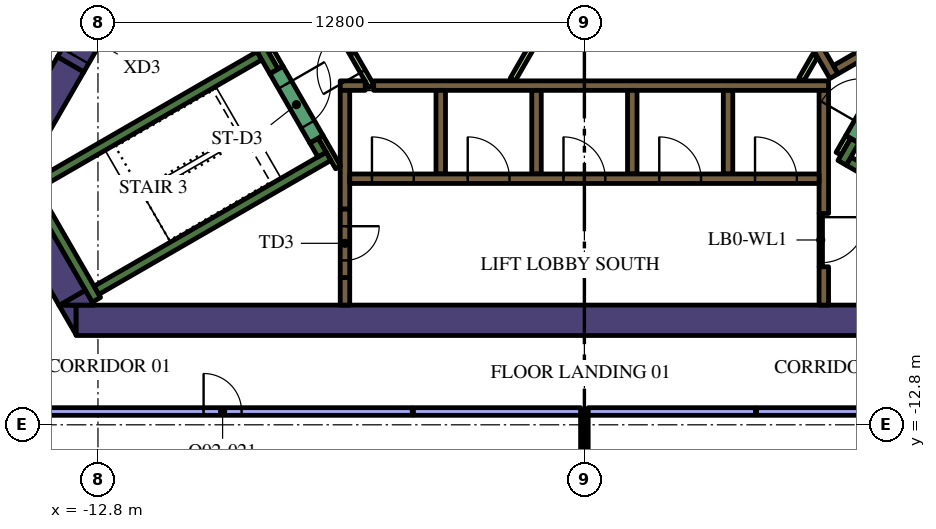
"""IFC4 building model, lengths in metres.
Left out: names, types, materials, properties, quantities, classifications, styles, units other than length and angle.
Written with IfcOpenShell. Run it as: python <this file> out.ifc"""

import sys

from ifc_helpers import new_model, si_unit, direction, frame, frame_2d, origin, place, context, subcontext, project, spatial, polyline, rectangle, outline, extrude, element, fill, save


model = new_model("IFC4")
c1 = context("Model", 3, precision=1e-05, world=origin(), true_north=direction((0.0, 1.0)))
c2 = subcontext(c1, "Body", "Model", "MODEL_VIEW")
j1 = project(units=[si_unit("LENGTHUNIT", "METRE"), si_unit("PLANEANGLEUNIT", "RADIAN")], contexts=[c1])
p1 = place(None, origin())
s1 = spatial("IfcSite", under=j1, at=p1, CompositionType="ELEMENT")
p2 = place(p1, origin())
s2 = spatial("IfcBuilding", under=s1, at=p2, CompositionType="ELEMENT")
p3 = place(p2, frame((0.0, 0.0, 154.2)))
s3 = spatial("IfcBuildingStorey", under=s2, at=p3, CompositionType="ELEMENT", Elevation=154.2)
p4 = place(p3, frame((-13.378, -10.05, 0.0), z_axis=(0.0, 0.0, 1.0), x_axis=(1.0, 0.0, 0.0)))
e1 = element("IfcWall", 1, at=p4, inside=s3, PredefinedType="SOLIDWALL", context=c2, shape_type="SweptSolid", body=[
    extrude(rectangle(XDim=22.282, YDim=0.8, at=frame_2d((11.141, 0.0))), origin(), (0.0, 0.0, 1.0), 4.2),
])
p5 = place(p3, origin())
e2 = element("IfcWall", 2, at=p5, inside=s3, PredefinedType="SOLIDWALL", context=c2, shape_type="SweptSolid", body=[
    extrude(outline(polyline([(-13.828, -9.65), (-13.38, -9.65), (-13.38, -10.426), (-13.828, -9.65)])), origin(), (0.0, 0.0, 1.0), 4.2),
])
p6 = place(p3, frame((-15.387, -6.148, 0.0), z_axis=(0.0, 0.0, 1.0), x_axis=(0.499984020225, -0.866034629516, 0.0)))
e3 = element("IfcWall", 3, at=p6, inside=s3, PredefinedType="SOLIDWALL", context=c2, shape_type="SweptSolid", body=[
    extrude(rectangle(XDim=3.824, YDim=0.8, at=frame_2d((1.912, 0.0))), origin(), (0.0, 0.0, 1.0), 4.2),
])
e4 = element("IfcWall", 4, at=p5, inside=s3, PredefinedType="SOLIDWALL", context=c2, shape_type="SweptSolid", body=[
    extrude(outline(polyline([(-12.904, -9.65), (-13.8, -9.65), (-13.128, -9.262), (-12.904, -9.65)])), origin(), (0.0, 0.0, 1.0), 4.2),
])
p7 = place(p3, frame((-13.518, -3.314, 0.0), z_axis=(0.0, 0.0, 1.0), x_axis=(-0.499969377405, -0.866043083026, 0.0)))
e5 = element("IfcWall", 5, at=p7, inside=s3, PredefinedType="SOLIDWALL", context=c2, shape_type="SweptSolid", body=[
    extrude(rectangle(XDim=2.824, YDim=0.8, at=frame_2d((1.412, 0.0))), origin(), (0.0, 0.0, 1.0), 4.2),
])
p8 = place(p3, frame((12.84, -9.261, 0.0), z_axis=(0.0, 0.0, 1.0), x_axis=(-0.866013990052, 0.500019768644, 0.0)))
e6 = element("IfcWall", 6, at=p8, inside=s3, PredefinedType="SOLIDWALL", context=c2, shape_type="SweptSolid", body=[
    extrude(rectangle(XDim=6.8, YDim=0.25, at=frame_2d((3.4, 0.0))), origin(), (0.0, 0.0, 1.0), 4.2),
])
p9 = place(p3, frame((6.78, -5.906, 0.0), z_axis=(0.0, 0.0, 1.0), x_axis=(0.500223362819, 0.865896406789, 0.0)))
e7 = element("IfcWall", 7, at=p9, inside=s3, PredefinedType="SOLIDWALL", context=c2, shape_type="SweptSolid", body=[
    extrude(rectangle(XDim=0.675, YDim=0.25, at=frame_2d((0.337, 0.0))), origin(), (0.0, 0.0, 1.0), 4.2),
])
p10 = place(p3, frame((-12.84, -9.511, 0.0), z_axis=(0.0, 0.0, 1.0), x_axis=(-0.499997733992, 0.866026712061, 0.0)))
e8 = element("IfcWall", 8, at=p10, inside=s3, PredefinedType="SOLIDWALL", context=c2, shape_type="SweptSolid", body=[
    extrude(rectangle(XDim=3.634, YDim=0.25, at=frame_2d((1.817, 0.0))), origin(), (0.0, 0.0, 1.0), 4.2),
])
p11 = place(p3, frame((-14.44, -6.49, 0.0), z_axis=(0.0, 0.0, 1.0), x_axis=(0.866022966069, 0.500004222222, 0.0)))
e9 = element("IfcWall", 9, at=p11, inside=s3, PredefinedType="SOLIDWALL", context=c2, shape_type="SweptSolid", body=[
    extrude(rectangle(XDim=6.8, YDim=0.25, at=frame_2d((3.4, 0.0))), origin(), (0.0, 0.0, 1.0), 4.2),
])
p12 = place(p3, frame((-8.168, -3.503, 0.0), z_axis=(0.0, 0.0, 1.0), x_axis=(-0.499952099219, 0.866053057547, 0.0)))
e10 = element("IfcWall", 10, at=p12, inside=s3, PredefinedType="SOLIDWALL", context=c2, shape_type="SweptSolid", body=[
    extrude(rectangle(XDim=0.675, YDim=0.25, at=frame_2d((0.337, 0.0))), origin(), (0.0, 0.0, 1.0), 4.2),
])
p13 = place(p3, frame((-12.84, -9.261, 0.0), z_axis=(0.0, 0.0, 1.0), x_axis=(0.866016039709, 0.500016218704, 0.0)))
e11 = element("IfcWall", 11, at=p13, inside=s3, PredefinedType="SOLIDWALL", context=c2, shape_type="SweptSolid", body=[
    extrude(rectangle(XDim=7.05, YDim=0.25, at=frame_2d((3.525, 0.0))), origin(), (0.0, 0.0, 1.0), 4.2),
])
p14 = place(p3, frame((-6.905, -5.69, 0.0), z_axis=(0.0, 0.0, 1.0), x_axis=(-0.500402024738, 0.865793170242, 0.0)))
e12 = element("IfcWall", 12, at=p14, inside=s3, PredefinedType="SOLIDWALL", context=c2, shape_type="SweptSolid", body=[
    extrude(rectangle(XDim=0.425, YDim=0.25, at=frame_2d((0.212, 0.0))), origin(), (0.0, 0.0, 1.0), 4.2),
])
p15 = place(p3, frame((-6.3, -8.925, 0.0), z_axis=(0.0, 0.0, 1.0), x_axis=(0.0, -1.0, 0.0)))
e13 = element("IfcWall", 13, at=p15, inside=s3, PredefinedType="SOLIDWALL", context=c2, shape_type="SweptSolid", body=[
    extrude(rectangle(XDim=0.725, YDim=0.25, at=frame_2d((0.363, 0.0))), origin(), (0.0, 0.0, 1.0), 4.2),
])
p16 = place(p3, frame((-5.545, -3.875, 0.0), z_axis=(0.0, 0.0, 1.0), x_axis=(1.0, 0.0, 0.0)))
e14 = element("IfcWall", 14, at=p16, inside=s3, PredefinedType="SOLIDWALL", context=c2, shape_type="SweptSolid", body=[
    extrude(rectangle(XDim=11.97, YDim=0.25, at=frame_2d((5.985, 0.0))), origin(), (0.0, 0.0, 1.0), 4.2),
])
p17 = place(p3, frame((-6.425, -3.875, 0.0), z_axis=(0.0, 0.0, 1.0), x_axis=(1.0, 0.0, 0.0)))
e15 = element("IfcWall", 15, at=p17, inside=s3, PredefinedType="SOLIDWALL", context=c2, shape_type="SweptSolid", body=[
    extrude(rectangle(XDim=0.658, YDim=0.25, at=frame_2d((0.329, 0.0))), origin(), (0.0, 0.0, 1.0), 4.2),
])
p18 = place(p3, frame((6.3, -7.24, 0.0), z_axis=(0.0, 0.0, 1.0), x_axis=(0.0, 1.0, 0.0)))
e16 = element("IfcWall", 16, at=p18, inside=s3, PredefinedType="SOLIDWALL", context=c2, shape_type="SweptSolid", body=[
    extrude(rectangle(XDim=3.24, YDim=0.25, at=frame_2d((1.62, 0.0))), origin(), (0.0, 0.0, 1.0), 4.2),
])
p19 = place(p3, frame((6.3, -9.65, 0.0), z_axis=(0.0, 0.0, 1.0), x_axis=(0.0, 1.0, 0.0)))
e17 = element("IfcWall", 17, at=p19, inside=s3, PredefinedType="SOLIDWALL", context=c2, shape_type="SweptSolid", body=[
    extrude(rectangle(XDim=1.008, YDim=0.25, at=frame_2d((0.504, 0.0))), origin(), (0.0, 0.0, 1.0), 4.2),
])
for number, where, z_axis, x_axis in (
    (18, (3.78, -4.0, 0.0), (0.0, 0.0, 1.0), (0.0, -1.0, 0.0)),
    (19, (1.26, -4.0, 0.0), (0.0, 0.0, 1.0), (0.0, -1.0, 0.0)),
    (20, (-1.26, -4.0, 0.0), (0.0, 0.0, 1.0), (0.0, -1.0, 0.0)),
    (21, (-3.78, -4.0, 0.0), (0.0, 0.0, 1.0), (0.0, -1.0, 0.0)),
):
    element("IfcWall", number, at=place(p3, frame(where, z_axis=z_axis, x_axis=x_axis)), inside=s3, PredefinedType="SOLIDWALL", context=c2, shape_type="SweptSolid", body=[
        extrude(rectangle(XDim=2.2, YDim=0.25, at=frame_2d((1.1, 0.0))), origin(), (0.0, 0.0, 1.0), 4.2),
    ])
p20 = place(p3, frame((-6.3, -7.125, 0.0), z_axis=(0.0, 0.0, 1.0), x_axis=(0.0, 1.0, 0.0)))
e22 = element("IfcWall", 22, at=p20, inside=s3, PredefinedType="SOLIDWALL", context=c2, shape_type="SweptSolid", body=[
    extrude(rectangle(XDim=3.125, YDim=0.25, at=frame_2d((1.562, 0.0))), origin(), (0.0, 0.0, 1.0), 4.2),
])
p21 = place(p3, frame((6.568, -3.627, 0.0), z_axis=(0.0, 0.0, 1.0), x_axis=(-0.499999455981, 0.866025717874, 0.0)))
e23 = element("IfcWall", 23, at=p21, inside=s3, PredefinedType="SOLIDWALL", context=c2, shape_type="SweptSolid", body=[
    extrude(rectangle(XDim=11.978, YDim=0.25, at=frame_2d((5.989, 0.0))), origin(), (0.0, 0.0, 1.0), 4.2),
])
p22 = place(p3, frame((6.614, -3.456, 0.0), z_axis=(0.0, 0.0, 1.0), x_axis=(0.866032512851, 0.499987686533, 0.0)))
e24 = element("IfcWall", 24, at=p22, inside=s3, PredefinedType="SOLIDWALL", context=c2, shape_type="SweptSolid", body=[
    extrude(rectangle(XDim=2.975, YDim=0.25, at=frame_2d((1.487, 0.0))), origin(), (0.0, 0.0, 1.0), 4.2),
])
p23 = place(p3, frame((-8.252, -2.958, 0.0), z_axis=(0.0, 0.0, 1.0), x_axis=(0.500174715838, -0.865924508047, 0.0)))
e25 = element("IfcWall", 25, at=p23, inside=s3, PredefinedType="PARTITIONING", context=c2, shape_type="SweptSolid", body=[
    extrude(rectangle(XDim=0.514, YDim=0.15, at=frame_2d((0.257, 0.0))), origin(), (0.0, 0.0, 1.0), 3.15),
])
p24 = place(p3, frame((-6.48, -6.027, 0.0), z_axis=(0.0, 0.0, 1.0), x_axis=(-0.499927229454, 0.866067413802, 0.0)))
e26 = element("IfcWall", 26, at=p24, inside=s3, PredefinedType="PARTITIONING", context=c2, shape_type="SweptSolid", body=[
    extrude(rectangle(XDim=0.929, YDim=0.15, at=frame_2d((0.464, 0.0))), origin(), (0.0, 0.0, 1.0), 4.2),
])
p25 = place(p3, frame((6.945, -5.222, 0.0), z_axis=(0.0, 0.0, 1.0), x_axis=(-0.499818422106, -0.866130212453, 0.0)))
e27 = element("IfcWall", 27, at=p25, inside=s3, PredefinedType="PARTITIONING", context=c2, shape_type="SweptSolid", body=[
    extrude(rectangle(XDim=0.514, YDim=0.15, at=frame_2d((0.257, 0.0))), origin(), (0.0, 0.0, 1.0), 3.15),
])
p26 = place(p3, frame((5.705, -3.718, 0.0), z_axis=(0.0, 0.0, 1.0), x_axis=(0.499962090823, 0.866047289552, 0.0)))
e28 = element("IfcWall", 28, at=p26, inside=s3, PredefinedType="PARTITIONING", context=c2, shape_type="SweptSolid", body=[
    extrude(rectangle(XDim=0.735, YDim=0.15, at=frame_2d((0.367, 0.0))), origin(), (0.0, 0.0, 1.0), 3.15),
])
p27 = place(p3, frame((-1.887, -3.718, 0.0), z_axis=(0.0, 0.0, 1.0), x_axis=(0.500043732237, 0.866000153493, 0.0)))
e29 = element("IfcWall", 29, at=p27, inside=s3, PredefinedType="PARTITIONING", context=c2, shape_type="SweptSolid", body=[
    extrude(rectangle(XDim=3.114, YDim=0.15, at=frame_2d((1.557, 0.0))), origin(), (0.0, 0.0, 1.0), 3.15),
])
p28 = place(p3, frame((-6.175, -6.325, 0.0), z_axis=(0.0, 0.0, 1.0), x_axis=(1.0, 0.0, 0.0)))
e30 = element("IfcWall", 30, at=p28, inside=s3, PredefinedType="SOLIDWALL", context=c2, shape_type="SweptSolid", body=[
    extrude(rectangle(XDim=12.35, YDim=0.25, at=frame_2d((6.175, 0.0))), origin(), (0.0, 0.0, 1.0), 4.2),
])
p29 = place(p28, frame((0.585, 0.0, 0.0)))
e31 = element("IfcOpeningElement", 31, at=p29, cuts=e30, PredefinedType="OPENING", context=c2, shape_type="SweptSolid", body=[
    extrude(rectangle(XDim=1.1, YDim=2.1, at=frame_2d((0.55, 1.05))), frame((0.0, 0.135, 0.0), z_axis=(0.0, -1.0, 0.0), x_axis=(1.0, 0.0, 0.0)), (0.0, 0.0, 1.0), 0.27),
])
p30 = place(p28, frame((3.105, 0.0, 0.0)))
e32 = element("IfcOpeningElement", 32, at=p30, cuts=e30, PredefinedType="OPENING", context=c2, shape_type="SweptSolid", body=[
    extrude(rectangle(XDim=1.1, YDim=2.1, at=frame_2d((0.55, 1.05))), frame((0.0, 0.135, 0.0), z_axis=(0.0, -1.0, 0.0), x_axis=(1.0, 0.0, 0.0)), (0.0, 0.0, 1.0), 0.27),
])
p31 = place(p28, frame((5.625, 0.0, 0.0)))
e33 = element("IfcOpeningElement", 33, at=p31, cuts=e30, PredefinedType="OPENING", context=c2, shape_type="SweptSolid", body=[
    extrude(rectangle(XDim=1.1, YDim=2.1, at=frame_2d((0.55, 1.05))), frame((0.0, 0.135, 0.0), z_axis=(0.0, -1.0, 0.0), x_axis=(1.0, 0.0, 0.0)), (0.0, 0.0, 1.0), 0.27),
])
p32 = place(p28, frame((8.145, 0.0, 0.0)))
e34 = element("IfcOpeningElement", 34, at=p32, cuts=e30, PredefinedType="OPENING", context=c2, shape_type="SweptSolid", body=[
    extrude(rectangle(XDim=1.1, YDim=2.1, at=frame_2d((0.55, 1.05))), frame((0.0, 0.135, 0.0), z_axis=(0.0, -1.0, 0.0), x_axis=(1.0, 0.0, 0.0)), (0.0, 0.0, 1.0), 0.27),
])
p33 = place(p28, frame((10.665, 0.0, 0.0)))
e35 = element("IfcOpeningElement", 35, at=p33, cuts=e30, PredefinedType="OPENING", context=c2, shape_type="SweptSolid", body=[
    extrude(rectangle(XDim=1.1, YDim=2.1, at=frame_2d((0.55, 1.05))), frame((0.0, 0.135, 0.0), z_axis=(0.0, -1.0, 0.0), x_axis=(1.0, 0.0, 0.0)), (0.0, 0.0, 1.0), 0.27),
])
p34 = place(p3, frame((7.053, -5.284, 0.0), z_axis=(0.0, 0.0, 1.0), x_axis=(0.500078061341, 0.865980330357, 0.0)))
e36 = element("IfcWall", 36, at=p34, inside=s3, PredefinedType="SOLIDWALL", context=c2, shape_type="SweptSolid", body=[
    extrude(rectangle(XDim=2.1, YDim=0.4, at=frame_2d((1.05, 0.0))), origin(), (0.0, 0.0, 1.0), 4.2),
])
p35 = place(p34, frame((0.45, 0.0, 0.0)))
e37 = element("IfcOpeningElement", 37, at=p35, cuts=e36, PredefinedType="OPENING", context=c2, shape_type="SweptSolid", body=[
    extrude(rectangle(XDim=1.2, YDim=2.1, at=frame_2d((0.6, 1.05))), frame((0.0, 0.21, 0.0), z_axis=(0.0, -1.0, 0.0), x_axis=(1.0, 0.0, 0.0)), (0.0, 0.0, 1.0), 0.42),
])
p36 = place(p3, frame((-8.103, -3.466, 0.0), z_axis=(0.0, 0.0, 1.0), x_axis=(0.500078061341, -0.865980330357, 0.0)))
e38 = element("IfcWall", 38, at=p36, inside=s3, PredefinedType="SOLIDWALL", context=c2, shape_type="SweptSolid", body=[
    extrude(rectangle(XDim=2.1, YDim=0.4, at=frame_2d((1.05, 0.0))), origin(), (0.0, 0.0, 1.0), 4.2),
])
p37 = place(p36, frame((0.45, 0.0, 0.0)))
e39 = element("IfcOpeningElement", 39, at=p37, cuts=e38, PredefinedType="OPENING", context=c2, shape_type="SweptSolid", body=[
    extrude(rectangle(XDim=1.2, YDim=2.1, at=frame_2d((0.6, 1.05))), frame((0.0, 0.21, 0.0), z_axis=(0.0, -1.0, 0.0), x_axis=(1.0, 0.0, 0.0)), (0.0, 0.0, 1.0), 0.42),
])
p38 = place(p3, frame((-6.3, -7.125, 0.0), z_axis=(0.0, 0.0, 1.0), x_axis=(0.0, -1.0, 0.0)))
e40 = element("IfcWall", 40, at=p38, inside=s3, PredefinedType="SOLIDWALL", context=c2, shape_type="SweptSolid", body=[
    extrude(rectangle(XDim=1.8, YDim=0.25, at=frame_2d((0.9, 0.0))), origin(), (0.0, 0.0, 1.0), 4.2),
])
p39 = place(p38, frame((0.45, 0.0, 0.0)))
e41 = element("IfcOpeningElement", 41, at=p39, cuts=e40, PredefinedType="OPENING", context=c2, shape_type="SweptSolid", body=[
    extrude(rectangle(XDim=0.9, YDim=2.1, at=frame_2d((0.45, 1.05))), frame((0.0, 0.135, 0.0), z_axis=(0.0, -1.0, 0.0), x_axis=(1.0, 0.0, 0.0)), (0.0, 0.0, 1.0), 0.27),
])
p40 = place(p3, frame((-5.606, -3.89, 0.0), z_axis=(0.0, 0.0, 1.0), x_axis=(-0.500027713859, 0.866009402589, 0.0)))
e42 = element("IfcWall", 42, at=p40, inside=s3, PredefinedType="PARTITIONING", context=c2, shape_type="SweptSolid", body=[
    extrude(rectangle(XDim=2.1, YDim=0.15, at=frame_2d((1.05, 0.0))), origin(), (0.0, 0.0, 1.0), 3.15),
])
p41 = place(p40, frame((0.45, 0.0, 0.0)))
e43 = element("IfcOpeningElement", 43, at=p41, cuts=e42, PredefinedType="OPENING", context=c2, shape_type="SweptSolid", body=[
    extrude(rectangle(XDim=1.2, YDim=2.1, at=frame_2d((0.6, 1.05))), frame((0.0, 0.085, 0.0), z_axis=(0.0, -1.0, 0.0), x_axis=(1.0, 0.0, 0.0)), (0.0, 0.0, 1.0), 0.17),
])
p42 = place(p3, frame((6.22, -7.237, 0.0), z_axis=(0.0, 0.0, 1.0), x_axis=(0.0, -1.0, 0.0)))
e44 = element("IfcWall", 44, at=p42, inside=s3, PredefinedType="PARTITIONING", context=c2, shape_type="SweptSolid", body=[
    extrude(rectangle(XDim=1.4, YDim=0.09, at=frame_2d((0.7, 0.0))), origin(), (0.0, 0.0, 1.0), 3.15),
])
p43 = place(p42, frame((0.1, 0.0, 0.0)))
e45 = element("IfcOpeningElement", 45, at=p43, cuts=e44, PredefinedType="OPENING", context=c2, shape_type="SweptSolid", body=[
    extrude(rectangle(XDim=1.2, YDim=2.1, at=frame_2d((0.6, 1.05))), frame((0.0, 0.055, 0.0), z_axis=(0.0, -1.0, 0.0), x_axis=(1.0, 0.0, 0.0)), (0.0, 0.0, 1.0), 0.11),
])
p44 = place(p3, frame((-13.518, -3.314, 0.0), z_axis=(0.0, 0.0, 1.0), x_axis=(0.500062241894, 0.865989465428, 0.0)))
e46 = element("IfcWall", 46, at=p44, inside=s3, PredefinedType="SOLIDWALL", context=c2, shape_type="SweptSolid", body=[
    extrude(rectangle(XDim=1.7, YDim=0.8, at=frame_2d((0.85, 0.0))), origin(), (0.0, 0.0, 1.0), 4.2),
])
p45 = place(p44, frame((0.25, 0.0, 0.0)))
e47 = element("IfcOpeningElement", 47, at=p45, cuts=e46, PredefinedType="OPENING", context=c2, shape_type="SweptSolid", body=[
    extrude(rectangle(XDim=1.2, YDim=2.1, at=frame_2d((0.6, 1.05))), frame((0.0, 0.41, 0.0), z_axis=(0.0, -1.0, 0.0), x_axis=(1.0, 0.0, 0.0)), (0.0, 0.0, 1.0), 0.82),
])
p46 = place(p3, frame((0.0, -16.493, 0.0), z_axis=(0.0, 0.0, 1.0), x_axis=(0.0, 1.0, 0.0)))
e48 = element("IfcWall", 48, at=p46, inside=s3, PredefinedType="PARTITIONING", context=c2, shape_type="SweptSolid", body=[
    extrude(rectangle(XDim=4.043, YDim=0.2, at=frame_2d((2.021, 0.0))), origin(), (0.0, 0.0, 1.0), 3.15),
])
p47 = place(p3, frame((0.1, -12.45, 0.0), z_axis=(0.0, 0.0, 1.0), x_axis=(1.0, 0.0, 0.0)))
e49 = element("IfcWall", 49, at=p47, inside=s3, PredefinedType="PARTITIONING", context=c2, shape_type="SweptSolid", body=[
    extrude(rectangle(XDim=4.4, YDim=0.2, at=frame_2d((2.2, 0.0))), origin(), (0.0, 0.0, 1.0), 3.15),
])
p48 = place(p3, frame((4.53, -12.45, 0.0), z_axis=(0.0, 0.0, 1.0), x_axis=(1.0, 0.0, 0.0)))
e50 = element("IfcWall", 50, at=p48, inside=s3, PredefinedType="PARTITIONING", context=c2, shape_type="SweptSolid", body=[
    extrude(rectangle(XDim=9.99, YDim=0.2, at=frame_2d((4.995, 0.0))), origin(), (0.0, 0.0, 1.0), 3.15),
])
p49 = place(p48, frame((4.5, 0.0, 0.0)))
e51 = element("IfcOpeningElement", 51, at=p49, cuts=e50, PredefinedType="OPENING", context=c2, shape_type="SweptSolid", body=[
    extrude(rectangle(XDim=1.0, YDim=2.1, at=frame_2d((0.5, 1.05))), frame((0.0, 0.11, 0.0), z_axis=(0.0, -1.0, 0.0), x_axis=(1.0, 0.0, 0.0)), (0.0, 0.0, 1.0), 0.22),
])
p50 = place(p3, frame((-13.047, 2.302, 0.0), z_axis=(0.0, 0.0, 1.0), x_axis=(-0.499986873641, -0.866032982159, 0.0)))
e52 = element("IfcWall", 52, at=p50, inside=s3, PredefinedType="PARTITIONING", context=c2, shape_type="SweptSolid", body=[
    extrude(rectangle(XDim=9.99, YDim=0.2, at=frame_2d((4.995, 0.0))), origin(), (0.0, 0.0, 1.0), 3.15),
])
p51 = place(p50, frame((4.5, 0.0, 0.0)))
e53 = element("IfcOpeningElement", 53, at=p51, cuts=e52, PredefinedType="OPENING", context=c2, shape_type="SweptSolid", body=[
    extrude(rectangle(XDim=1.0, YDim=2.1, at=frame_2d((0.5, 1.05))), frame((0.0, 0.11, 0.0), z_axis=(0.0, -1.0, 0.0), x_axis=(1.0, 0.0, 0.0)), (0.0, 0.0, 1.0), 0.22),
])
p52 = place(p3, frame((-4.5, -12.45, 0.0), z_axis=(0.0, 0.0, 1.0), x_axis=(1.0, 0.0, 0.0)))
e54 = element("IfcWall", 54, at=p52, inside=s3, PredefinedType="PARTITIONING", context=c2, shape_type="SweptSolid", body=[
    extrude(rectangle(XDim=4.4, YDim=0.2, at=frame_2d((2.2, 0.0))), origin(), (0.0, 0.0, 1.0), 3.15),
])
p53 = place(p3, frame((-14.521, -12.45, 0.0), z_axis=(0.0, 0.0, 1.0), x_axis=(1.0, 0.0, 0.0)))
e55 = element("IfcWall", 55, at=p53, inside=s3, PredefinedType="PARTITIONING", context=c2, shape_type="SweptSolid", body=[
    extrude(rectangle(XDim=9.99, YDim=0.2, at=frame_2d((4.995, 0.0))), origin(), (0.0, 0.0, 1.0), 3.15),
])
p54 = place(p53, frame((4.5, 0.0, 0.0)))
e56 = element("IfcOpeningElement", 56, at=p54, cuts=e55, PredefinedType="OPENING", context=c2, shape_type="SweptSolid", body=[
    extrude(rectangle(XDim=1.0, YDim=2.1, at=frame_2d((0.5, 1.05))), frame((0.0, 0.11, 0.0), z_axis=(0.0, -1.0, 0.0), x_axis=(1.0, 0.0, 0.0)), (0.0, 0.0, 1.0), 0.22),
])
p55 = place(p29, origin())
e57 = element("IfcDoor", 57, at=p55, inside=s3, OperationType="DOUBLE_DOOR_SLIDING", PredefinedType="DOOR", context=c2, shape_type="SweptSolid", body=[
    extrude(rectangle(XDim=1.1, YDim=2.1, at=frame_2d((0.55, 1.05))), frame((0.0, 0.025, 0.0), z_axis=(0.0, -1.0, 0.0), x_axis=(1.0, 0.0, 0.0)), (0.0, 0.0, 1.0), 0.05),
])
fill(e31, e57)
p56 = place(p30, origin())
e58 = element("IfcDoor", 58, at=p56, inside=s3, OperationType="DOUBLE_DOOR_SLIDING", PredefinedType="DOOR", context=c2, shape_type="SweptSolid", body=[
    extrude(rectangle(XDim=1.1, YDim=2.1, at=frame_2d((0.55, 1.05))), frame((0.0, 0.025, 0.0), z_axis=(0.0, -1.0, 0.0), x_axis=(1.0, 0.0, 0.0)), (0.0, 0.0, 1.0), 0.05),
])
fill(e32, e58)
p57 = place(p31, origin())
e59 = element("IfcDoor", 59, at=p57, inside=s3, OperationType="DOUBLE_DOOR_SLIDING", PredefinedType="DOOR", context=c2, shape_type="SweptSolid", body=[
    extrude(rectangle(XDim=1.1, YDim=2.1, at=frame_2d((0.55, 1.05))), frame((0.0, 0.025, 0.0), z_axis=(0.0, -1.0, 0.0), x_axis=(1.0, 0.0, 0.0)), (0.0, 0.0, 1.0), 0.05),
])
fill(e33, e59)
p58 = place(p32, origin())
e60 = element("IfcDoor", 60, at=p58, inside=s3, OperationType="DOUBLE_DOOR_SLIDING", PredefinedType="DOOR", context=c2, shape_type="SweptSolid", body=[
    extrude(rectangle(XDim=1.1, YDim=2.1, at=frame_2d((0.55, 1.05))), frame((0.0, 0.025, 0.0), z_axis=(0.0, -1.0, 0.0), x_axis=(1.0, 0.0, 0.0)), (0.0, 0.0, 1.0), 0.05),
])
fill(e34, e60)
p59 = place(p33, origin())
e61 = element("IfcDoor", 61, at=p59, inside=s3, OperationType="DOUBLE_DOOR_SLIDING", PredefinedType="DOOR", context=c2, shape_type="SweptSolid", body=[
    extrude(rectangle(XDim=1.1, YDim=2.1, at=frame_2d((0.55, 1.05))), frame((0.0, 0.025, 0.0), z_axis=(0.0, -1.0, 0.0), x_axis=(1.0, 0.0, 0.0)), (0.0, 0.0, 1.0), 0.05),
])
fill(e35, e61)
p60 = place(p37, origin())
e62 = element("IfcDoor", 62, at=p60, inside=s3, OperationType="SINGLE_SWING_LEFT", PredefinedType="DOOR", context=c2, shape_type="SweptSolid", body=[
    extrude(rectangle(XDim=1.2, YDim=2.1, at=frame_2d((0.6, 1.05))), frame((0.0, 0.025, 0.0), z_axis=(0.0, -1.0, 0.0), x_axis=(1.0, 0.0, 0.0)), (0.0, 0.0, 1.0), 0.05),
])
fill(e39, e62)
p61 = place(p39, origin())
e63 = element("IfcDoor", 63, at=p61, inside=s3, OperationType="SINGLE_SWING_LEFT", PredefinedType="DOOR", context=c2, shape_type="SweptSolid", body=[
    extrude(rectangle(XDim=0.9, YDim=2.1, at=frame_2d((0.45, 1.05))), frame((0.0, 0.025, 0.0), z_axis=(0.0, -1.0, 0.0), x_axis=(1.0, 0.0, 0.0)), (0.0, 0.0, 1.0), 0.05),
])
fill(e41, e63)
p62 = place(p41, origin())
e64 = element("IfcDoor", 64, at=p62, inside=s3, OperationType="SINGLE_SWING_LEFT", PredefinedType="DOOR", context=c2, shape_type="SweptSolid", body=[
    extrude(rectangle(XDim=1.2, YDim=2.1, at=frame_2d((0.6, 1.05))), frame((0.0, 0.025, 0.0), z_axis=(0.0, -1.0, 0.0), x_axis=(1.0, 0.0, 0.0)), (0.0, 0.0, 1.0), 0.05),
])
fill(e43, e64)
p63 = place(p43, origin())
e65 = element("IfcDoor", 65, at=p63, inside=s3, OperationType="SINGLE_SWING_LEFT", PredefinedType="DOOR", context=c2, shape_type="SweptSolid", body=[
    extrude(rectangle(XDim=1.2, YDim=2.1, at=frame_2d((0.6, 1.05))), frame((0.0, 0.025, 0.0), z_axis=(0.0, -1.0, 0.0), x_axis=(1.0, 0.0, 0.0)), (0.0, 0.0, 1.0), 0.05),
])
fill(e45, e65)
p64 = place(p45, origin())
e66 = element("IfcDoor", 66, at=p64, inside=s3, OperationType="SINGLE_SWING_LEFT", PredefinedType="DOOR", context=c2, shape_type="SweptSolid", body=[
    extrude(rectangle(XDim=1.2, YDim=2.1, at=frame_2d((0.6, 1.05))), frame((0.0, 0.025, 0.0), z_axis=(0.0, -1.0, 0.0), x_axis=(1.0, 0.0, 0.0)), (0.0, 0.0, 1.0), 0.05),
])
fill(e47, e66)
p65 = place(p54, origin())
e67 = element("IfcDoor", 67, at=p65, inside=s3, OperationType="SINGLE_SWING_RIGHT", PredefinedType="DOOR", context=c2, shape_type="SweptSolid", body=[
    extrude(rectangle(XDim=1.0, YDim=2.1, at=frame_2d((0.5, 1.05))), frame((0.0, 0.025, 0.0), z_axis=(0.0, -1.0, 0.0), x_axis=(1.0, 0.0, 0.0)), (0.0, 0.0, 1.0), 0.05),
])
fill(e56, e67)
save(model, sys.argv[1])
